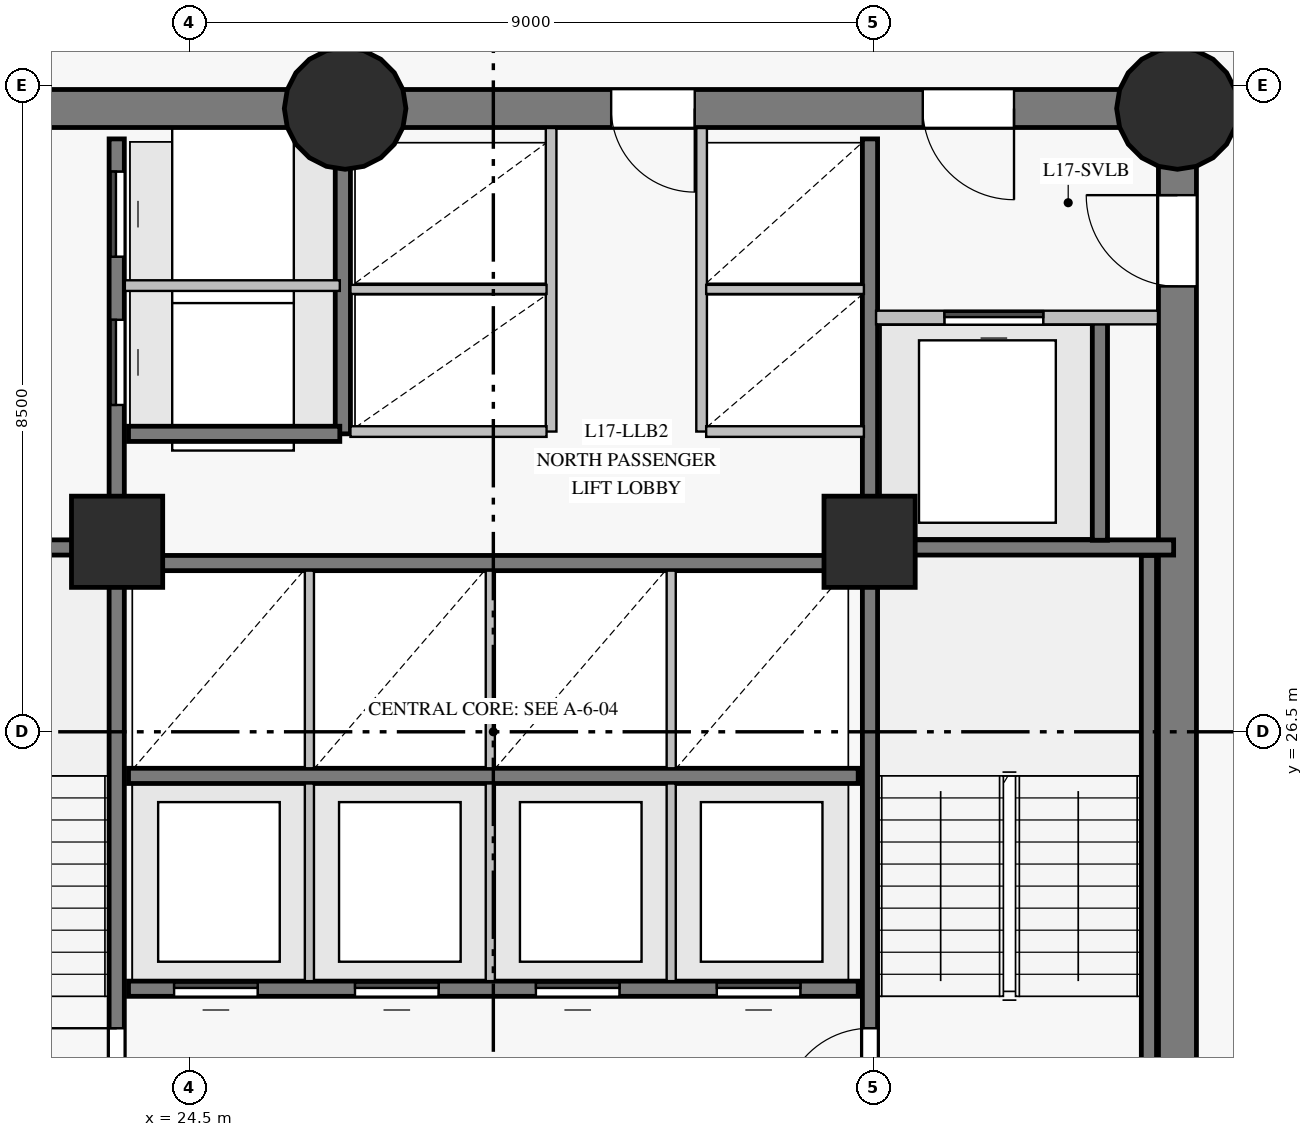
"""IFC4 building model, lengths in metres.
Left out: names, types, materials, properties, quantities, classifications, styles, units other than length and angle.
Written with IfcOpenShell. Run it as: python <this file> out.ifc"""

import sys

from ifc_helpers import new_model, si_unit, direction, frame, frame_2d, origin, origin_with_axes, origin_2d, place, context, subcontext, project, spatial, rectangle, circle, extrude, source, transform, mapped, element, fill, save


model = new_model("IFC4")
c1 = context("Model", 3, precision=1e-05, world=origin(), true_north=direction((0.0, 1.0)))
c2 = subcontext(c1, "Body", "Model", "MODEL_VIEW")
j1 = project(units=[si_unit("LENGTHUNIT", "METRE"), si_unit("PLANEANGLEUNIT", "RADIAN")], contexts=[c1])
p1 = place(None, origin())
s1 = spatial("IfcSite", under=j1, at=p1, CompositionType="ELEMENT")
p2 = place(p1, origin())
s2 = spatial("IfcBuilding", under=s1, at=p2, CompositionType="ELEMENT")
p3 = place(p2, frame((0.0, 0.0, 66.1)))
s3 = spatial("IfcBuildingStorey", under=s2, at=p3, CompositionType="ELEMENT", Elevation=66.1)
p4 = place(p3, frame((37.5, 18.3, 0.0), z_axis=(0.0, 0.0, 1.0), x_axis=(0.0, 1.0, 0.0)))
e1 = element("IfcWall", 1, at=p4, inside=s3, PredefinedType="SHEAR", context=c2, shape_type="SweptSolid", body=[
    extrude(rectangle(XDim=16.4, YDim=0.5, at=frame_2d((8.2, 0.0))), origin(), (0.0, 0.0, 1.0), 3.35),
])
p5 = place(p4, frame((14.06, 0.0, 0.0)))
e2 = element("IfcOpeningElement", 2, at=p5, cuts=e1, PredefinedType="OPENING", context=c2, shape_type="SweptSolid", body=[
    extrude(rectangle(XDim=1.2, YDim=2.15, at=frame_2d((0.6, 1.075))), frame((0.0, 0.26, 0.0), z_axis=(0.0, -1.0, 0.0), x_axis=(1.0, 0.0, 0.0)), (0.0, 0.0, 1.0), 0.52),
])
p6 = place(p3, frame((37.5, 34.7, 0.0), z_axis=(0.0, 0.0, 1.0), x_axis=(-1.0, 0.0, 0.0)))
e3 = element("IfcWall", 3, at=p6, inside=s3, PredefinedType="SHEAR", context=c2, shape_type="SweptSolid", body=[
    extrude(rectangle(XDim=10.95, YDim=0.5, at=frame_2d((5.475, 0.0))), origin(), (0.0, 0.0, 1.0), 3.35),
])
p7 = place(p6, frame((2.15, 0.0, 0.0)))
e4 = element("IfcOpeningElement", 4, at=p7, cuts=e3, PredefinedType="OPENING", context=c2, shape_type="SweptSolid", body=[
    extrude(rectangle(XDim=1.2, YDim=2.15, at=frame_2d((0.6, 1.075))), frame((0.0, 0.26, 0.0), z_axis=(0.0, -1.0, 0.0), x_axis=(1.0, 0.0, 0.0)), (0.0, 0.0, 1.0), 0.52),
])
p8 = place(p6, frame((6.35, 0.0, 0.0)))
e5 = element("IfcOpeningElement", 5, at=p8, cuts=e3, PredefinedType="OPENING", context=c2, shape_type="SweptSolid", body=[
    extrude(rectangle(XDim=1.1, YDim=2.15, at=frame_2d((0.55, 1.075))), frame((0.0, 0.26, 0.0), z_axis=(0.0, -1.0, 0.0), x_axis=(1.0, 0.0, 0.0)), (0.0, 0.0, 1.0), 0.52),
])
p9 = place(p3, frame((26.55, 34.7, 0.0), z_axis=(0.0, 0.0, 1.0), x_axis=(-1.0, 0.0, 0.0)))
e6 = element("IfcWall", 6, at=p9, inside=s3, PredefinedType="SHEAR", context=c2, shape_type="SweptSolid", body=[
    extrude(rectangle(XDim=7.05, YDim=0.5, at=frame_2d((3.525, 0.0))), origin(), (0.0, 0.0, 1.0), 3.35),
])
p10 = place(p9, frame((4.25, 0.0, 0.0)))
e7 = element("IfcOpeningElement", 7, at=p10, cuts=e6, PredefinedType="OPENING", context=c2, shape_type="SweptSolid", body=[
    extrude(rectangle(XDim=1.1, YDim=2.15, at=frame_2d((0.55, 1.075))), frame((0.0, 0.26, 0.0), z_axis=(0.0, -1.0, 0.0), x_axis=(1.0, 0.0, 0.0)), (0.0, 0.0, 1.0), 0.52),
])
m1 = source(origin_with_axes(), c2, "Body", "SweptSolid", [
    extrude(circle(Radius=0.8, at=origin_2d()), origin(), (0.0, 0.0, 1.0), 3.6),
])
for number, where, z_axis, x_axis in (
    (8, (26.55, 34.7, 0.0), (0.0, 0.0, 1.0), (1.0, 0.0, 0.0)),
    (9, (37.5, 34.7, 0.0), (0.0, 0.0, 1.0), (1.0, 0.0, 0.0)),
):
    element("IfcColumn", number, at=place(p3, frame(where, z_axis=z_axis, x_axis=x_axis)), inside=s3, PredefinedType="COLUMN", context=c2, shape_type="MappedRepresentation", body=[
        mapped(m1, transform((0.0, 0.0, 0.0), scale=1.0)),
    ])
m2 = source(origin_with_axes(), c2, "Body", "SweptSolid", [
    extrude(rectangle(XDim=1.2, YDim=1.2, at=origin_2d()), origin(), (0.0, 0.0, 1.0), 3.6),
])
for number, where, z_axis, x_axis in (
    (10, (23.55, 29.0, 0.0), (0.0, 0.0, 1.0), (1.0, 0.0, 0.0)),
    (11, (33.45, 29.0, 0.0), (0.0, 0.0, 1.0), (1.0, 0.0, 0.0)),
):
    element("IfcColumn", number, at=place(p3, frame(where, z_axis=z_axis, x_axis=x_axis)), inside=s3, PredefinedType="COLUMN", context=c2, shape_type="MappedRepresentation", body=[
        mapped(m2, transform((0.0, 0.0, 0.0), scale=1.0)),
    ])
p11 = place(p3, frame((23.545, 18.7, 0.0), z_axis=(0.0, 0.0, 1.0), x_axis=(0.0, 1.0, 0.0)))
e12 = element("IfcWall", 12, at=p11, inside=s3, PredefinedType="SHEAR", context=c2, shape_type="SweptSolid", body=[
    extrude(rectangle(XDim=15.6, YDim=0.2, at=frame_2d((7.8, 0.0))), origin(), (0.0, 0.0, 1.0), 3.35),
])
p12 = place(p11, frame((2.75, 0.0, 0.0)))
e13 = element("IfcOpeningElement", 13, at=p12, cuts=e12, PredefinedType="OPENING", context=c2, shape_type="SweptSolid", body=[
    extrude(rectangle(XDim=1.15, YDim=2.15, at=frame_2d((0.575, 1.075))), frame((0.0, 0.11, 0.0), z_axis=(0.0, -1.0, 0.0), x_axis=(1.0, 0.0, 0.0)), (0.0, 0.0, 1.0), 0.22),
])
p13 = place(p11, frame((0.14, 0.0, 0.0)))
e14 = element("IfcOpeningElement", 14, at=p13, cuts=e12, PredefinedType="OPENING", context=c2, shape_type="SweptSolid", body=[
    extrude(rectangle(XDim=0.88, YDim=2.1, at=frame_2d((0.44, 1.05))), frame((0.0, 0.11, 0.0), z_axis=(0.0, -1.0, 0.0), x_axis=(1.0, 0.0, 0.0)), (0.0, 0.0, 1.0), 0.22),
])
p14 = place(p11, frame((1.36, 0.0, 0.0)))
e15 = element("IfcOpeningElement", 15, at=p14, cuts=e12, PredefinedType="OPENING", context=c2, shape_type="SweptSolid", body=[
    extrude(rectangle(XDim=0.88, YDim=2.1, at=frame_2d((0.44, 1.05))), frame((0.0, 0.11, 0.0), z_axis=(0.0, -1.0, 0.0), x_axis=(1.0, 0.0, 0.0)), (0.0, 0.0, 1.0), 0.22),
])
p15 = place(p11, frame((12.1, 0.0, 0.0)))
e16 = element("IfcOpeningElement", 16, at=p15, cuts=e12, PredefinedType="OPENING", context=c2, shape_type="SweptSolid", body=[
    extrude(rectangle(XDim=1.12, YDim=2.15, at=frame_2d((0.56, 1.075))), frame((0.0, 0.11, 0.0), z_axis=(0.0, -1.0, 0.0), x_axis=(1.0, 0.0, 0.0)), (0.0, 0.0, 1.0), 0.22),
])
p16 = place(p11, frame((14.05, 0.0, 0.0)))
e17 = element("IfcOpeningElement", 17, at=p16, cuts=e12, PredefinedType="OPENING", context=c2, shape_type="SweptSolid", body=[
    extrude(rectangle(XDim=1.12, YDim=2.15, at=frame_2d((0.56, 1.075))), frame((0.0, 0.11, 0.0), z_axis=(0.0, -1.0, 0.0), x_axis=(1.0, 0.0, 0.0)), (0.0, 0.0, 1.0), 0.22),
])
p17 = place(p3, frame((33.455, 18.7, 0.0), z_axis=(0.0, 0.0, 1.0), x_axis=(0.0, 1.0, 0.0)))
e18 = element("IfcWall", 18, at=p17, inside=s3, PredefinedType="SHEAR", context=c2, shape_type="SweptSolid", body=[
    extrude(rectangle(XDim=15.6, YDim=0.2, at=frame_2d((7.8, 0.0))), origin(), (0.0, 0.0, 1.0), 3.35),
])
p18 = place(p17, frame((2.75, 0.0, 0.0)))
e19 = element("IfcOpeningElement", 19, at=p18, cuts=e18, PredefinedType="OPENING", context=c2, shape_type="SweptSolid", body=[
    extrude(rectangle(XDim=1.15, YDim=2.15, at=frame_2d((0.575, 1.075))), frame((0.0, 0.11, 0.0), z_axis=(0.0, -1.0, 0.0), x_axis=(1.0, 0.0, 0.0)), (0.0, 0.0, 1.0), 0.22),
])
p19 = place(p17, frame((0.55, 0.0, 0.0)))
e20 = element("IfcOpeningElement", 20, at=p19, cuts=e18, PredefinedType="OPENING", context=c2, shape_type="SweptSolid", body=[
    extrude(rectangle(XDim=0.94, YDim=2.1, at=frame_2d((0.47, 1.05))), frame((0.0, 0.11, 0.0), z_axis=(0.0, -1.0, 0.0), x_axis=(1.0, 0.0, 0.0)), (0.0, 0.0, 1.0), 0.22),
])
p20 = place(p3, frame((23.7, 23.12, 0.0), z_axis=(0.0, 0.0, 1.0), x_axis=(1.0, 0.0, 0.0)))
e21 = element("IfcWall", 21, at=p20, inside=s3, PredefinedType="SHEAR", context=c2, shape_type="SweptSolid", body=[
    extrude(rectangle(XDim=9.6, YDim=0.2, at=frame_2d((4.8, 0.0))), origin(), (0.0, 0.0, 1.0), 3.35),
])
p21 = place(p20, frame((0.6, 0.0, 0.0)))
e22 = element("IfcOpeningElement", 22, at=p21, cuts=e21, PredefinedType="OPENING", context=c2, shape_type="SweptSolid", body=[
    extrude(rectangle(XDim=1.1, YDim=2.15, at=frame_2d((0.55, 1.075))), frame((0.0, 0.11, 0.0), z_axis=(0.0, -1.0, 0.0), x_axis=(1.0, 0.0, 0.0)), (0.0, 0.0, 1.0), 0.22),
])
p22 = place(p20, frame((2.98, 0.0, 0.0)))
e23 = element("IfcOpeningElement", 23, at=p22, cuts=e21, PredefinedType="OPENING", context=c2, shape_type="SweptSolid", body=[
    extrude(rectangle(XDim=1.1, YDim=2.15, at=frame_2d((0.55, 1.075))), frame((0.0, 0.11, 0.0), z_axis=(0.0, -1.0, 0.0), x_axis=(1.0, 0.0, 0.0)), (0.0, 0.0, 1.0), 0.22),
])
p23 = place(p20, frame((5.36, 0.0, 0.0)))
e24 = element("IfcOpeningElement", 24, at=p23, cuts=e21, PredefinedType="OPENING", context=c2, shape_type="SweptSolid", body=[
    extrude(rectangle(XDim=1.1, YDim=2.15, at=frame_2d((0.55, 1.075))), frame((0.0, 0.11, 0.0), z_axis=(0.0, -1.0, 0.0), x_axis=(1.0, 0.0, 0.0)), (0.0, 0.0, 1.0), 0.22),
])
p24 = place(p20, frame((7.74, 0.0, 0.0)))
e25 = element("IfcOpeningElement", 25, at=p24, cuts=e21, PredefinedType="OPENING", context=c2, shape_type="SweptSolid", body=[
    extrude(rectangle(XDim=1.1, YDim=2.15, at=frame_2d((0.55, 1.075))), frame((0.0, 0.11, 0.0), z_axis=(0.0, -1.0, 0.0), x_axis=(1.0, 0.0, 0.0)), (0.0, 0.0, 1.0), 0.22),
])
for number, where, z_axis, x_axis in (
    (26, (23.7, 25.92, 0.0), (0.0, 0.0, 1.0), (1.0, 0.0, 0.0)),
    (27, (23.7, 28.72, 0.0), (0.0, 0.0, 1.0), (1.0, 0.0, 0.0)),
):
    element("IfcWall", number, at=place(p3, frame(where, z_axis=z_axis, x_axis=x_axis)), inside=s3, PredefinedType="SHEAR", context=c2, shape_type="SweptSolid", body=[
        extrude(rectangle(XDim=9.6, YDim=0.2, at=frame_2d((4.8, 0.0))), origin(), (0.0, 0.0, 1.0), 3.35),
    ])
p25 = place(p3, frame((37.125, 21.32, 0.0), z_axis=(0.0, 0.0, 1.0), x_axis=(0.0, 1.0, 0.0)))
e28 = element("IfcWall", 28, at=p25, inside=s3, PredefinedType="SHEAR", context=c2, shape_type="SweptSolid", body=[
    extrude(rectangle(XDim=7.5, YDim=0.2, at=frame_2d((3.75, 0.0))), origin(), (0.0, 0.0, 1.0), 3.35),
])
for number, where, z_axis, x_axis in (
    (29, (33.455, 28.925, 0.0), (0.0, 0.0, 1.0), (1.0, 0.0, 0.0)),
    (30, (19.55, 28.925, 0.0), (0.0, 0.0, 1.0), (1.0, 0.0, 0.0)),
):
    element("IfcWall", number, at=place(p3, frame(where, z_axis=z_axis, x_axis=x_axis)), inside=s3, PredefinedType="SHEAR", context=c2, shape_type="SweptSolid", body=[
        extrude(rectangle(XDim=3.995, YDim=0.2, at=frame_2d((1.998, 0.0))), origin(), (0.0, 0.0, 1.0), 3.35),
    ])
p26 = place(p3, frame((26.52, 30.42, 0.0), z_axis=(0.0, 0.0, 1.0), x_axis=(0.0, 1.0, 0.0)))
e31 = element("IfcWall", 31, at=p26, inside=s3, PredefinedType="SHEAR", context=c2, shape_type="SweptSolid", body=[
    extrude(rectangle(XDim=3.86, YDim=0.2, at=frame_2d((1.93, 0.0))), origin(), (0.0, 0.0, 1.0), 3.35),
])
p27 = place(p3, frame((36.48, 29.02, 0.0), z_axis=(0.0, 0.0, 1.0), x_axis=(0.0, 1.0, 0.0)))
e32 = element("IfcWall", 32, at=p27, inside=s3, PredefinedType="SHEAR", context=c2, shape_type="SweptSolid", body=[
    extrude(rectangle(XDim=2.86, YDim=0.2, at=frame_2d((1.43, 0.0))), origin(), (0.0, 0.0, 1.0), 3.35),
])
p28 = place(p3, frame((23.7, 30.42, 0.0), z_axis=(0.0, 0.0, 1.0), x_axis=(1.0, 0.0, 0.0)))
e33 = element("IfcWall", 33, at=p28, inside=s3, PredefinedType="SHEAR", context=c2, shape_type="SweptSolid", body=[
    extrude(rectangle(XDim=2.78, YDim=0.2, at=frame_2d((1.39, 0.0))), origin(), (0.0, 0.0, 1.0), 3.35),
])
for number, where, z_axis, x_axis in (
    (34, (29.26, 30.45, 0.0), (0.0, 0.0, 1.0), (0.0, 1.0, 0.0)),
    (35, (31.24, 30.45, 0.0), (0.0, 0.0, 1.0), (0.0, 1.0, 0.0)),
):
    element("IfcWall", number, at=place(p3, frame(where, z_axis=z_axis, x_axis=x_axis)), inside=s3, PredefinedType="PARTITIONING", context=c2, shape_type="SweptSolid", body=[
        extrude(rectangle(XDim=3.993, YDim=0.14, at=frame_2d((1.997, 0.0))), origin(), (0.0, 0.0, 1.0), 3.35),
    ])
p29 = place(p3, frame((33.535, 31.95, 0.0), z_axis=(0.0, 0.0, 1.0), x_axis=(1.0, 0.0, 0.0)))
e36 = element("IfcWall", 36, at=p29, inside=s3, PredefinedType="PARTITIONING", context=c2, shape_type="SweptSolid", body=[
    extrude(rectangle(XDim=3.709, YDim=0.18, at=frame_2d((1.854, 0.0))), origin(), (0.0, 0.0, 1.0), 3.35),
])
p30 = place(p29, frame((0.9, 0.0, 0.0)))
e37 = element("IfcOpeningElement", 37, at=p30, cuts=e36, PredefinedType="OPENING", context=c2, shape_type="SweptSolid", body=[
    extrude(rectangle(XDim=1.3, YDim=2.2, at=frame_2d((0.65, 1.1))), frame((0.0, 0.1, 0.0), z_axis=(0.0, -1.0, 0.0), x_axis=(1.0, 0.0, 0.0)), (0.0, 0.0, 1.0), 0.2),
])
p31 = place(p3, frame((23.652, 32.37, 0.0), z_axis=(0.0, 0.0, 1.0), x_axis=(1.0, 0.0, 0.0)))
e38 = element("IfcWall", 38, at=p31, inside=s3, PredefinedType="PARTITIONING", context=c2, shape_type="SweptSolid", body=[
    extrude(rectangle(XDim=2.828, YDim=0.14, at=frame_2d((1.414, 0.0))), origin(), (0.0, 0.0, 1.0), 3.35),
])
for number, where, z_axis, x_axis in (
    (39, (26.08, 23.22, 0.0), (0.0, 0.0, 1.0), (0.0, 1.0, 0.0)),
    (40, (28.46, 23.22, 0.0), (0.0, 0.0, 1.0), (0.0, 1.0, 0.0)),
    (41, (30.84, 23.22, 0.0), (0.0, 0.0, 1.0), (0.0, 1.0, 0.0)),
    (42, (26.08, 26.02, 0.0), (0.0, 0.0, 1.0), (0.0, 1.0, 0.0)),
    (43, (28.46, 26.02, 0.0), (0.0, 0.0, 1.0), (0.0, 1.0, 0.0)),
    (44, (30.84, 26.02, 0.0), (0.0, 0.0, 1.0), (0.0, 1.0, 0.0)),
):
    element("IfcWall", number, at=place(p3, frame(where, z_axis=z_axis, x_axis=x_axis)), inside=s3, PredefinedType="PARTITIONING", context=c2, shape_type="SweptSolid", body=[
        extrude(rectangle(XDim=2.6, YDim=0.12, at=frame_2d((1.3, 0.0))), origin(), (0.0, 0.0, 1.0), 3.35),
    ])
p32 = place(p3, frame((26.62, 30.45, 0.0), z_axis=(0.0, 0.0, 1.0), x_axis=(1.0, 0.0, 0.0)))
e45 = element("IfcWall", 45, at=p32, inside=s3, PredefinedType="PARTITIONING", context=c2, shape_type="SweptSolid", body=[
    extrude(rectangle(XDim=2.58, YDim=0.14, at=frame_2d((1.29, 0.0))), origin(), (0.0, 0.0, 1.0), 3.35),
])
p33 = place(p3, frame((26.62, 32.32, 0.0), z_axis=(0.0, 0.0, 1.0), x_axis=(1.0, 0.0, 0.0)))
e46 = element("IfcWall", 46, at=p33, inside=s3, PredefinedType="PARTITIONING", context=c2, shape_type="SweptSolid", body=[
    extrude(rectangle(XDim=2.58, YDim=0.12, at=frame_2d((1.29, 0.0))), origin(), (0.0, 0.0, 1.0), 3.35),
])
p34 = place(p3, frame((31.3, 30.45, 0.0), z_axis=(0.0, 0.0, 1.0), x_axis=(1.0, 0.0, 0.0)))
e47 = element("IfcWall", 47, at=p34, inside=s3, PredefinedType="PARTITIONING", context=c2, shape_type="SweptSolid", body=[
    extrude(rectangle(XDim=2.075, YDim=0.14, at=frame_2d((1.038, 0.0))), origin(), (0.0, 0.0, 1.0), 3.35),
])
p35 = place(p3, frame((31.3, 32.32, 0.0), z_axis=(0.0, 0.0, 1.0), x_axis=(1.0, 0.0, 0.0)))
e48 = element("IfcWall", 48, at=p35, inside=s3, PredefinedType="PARTITIONING", context=c2, shape_type="SweptSolid", body=[
    extrude(rectangle(XDim=2.075, YDim=0.12, at=frame_2d((1.038, 0.0))), origin(), (0.0, 0.0, 1.0), 3.35),
])
m3 = source(origin_with_axes(), c2, "Body", "SweptSolid", [
    extrude(rectangle(XDim=1.15, YDim=2.15, at=frame_2d((0.575, 1.075))), frame((0.0, 0.025, 0.0), z_axis=(0.0, -1.0, 0.0), x_axis=(1.0, 0.0, 0.0)), (0.0, 0.0, 1.0), 0.05),
])
p36 = place(p12, origin())
e49 = element("IfcDoor", 49, at=p36, inside=s3, OperationType="SINGLE_SWING_RIGHT", PredefinedType="DOOR", context=c2, shape_type="MappedRepresentation", body=[
    mapped(m3, transform((0.0, 0.0, 0.0), scale=1.0)),
])
fill(e13, e49)
p37 = place(p18, origin())
e50 = element("IfcDoor", 50, at=p37, inside=s3, OperationType="SINGLE_SWING_LEFT", PredefinedType="DOOR", context=c2, shape_type="MappedRepresentation", body=[
    mapped(m3, transform((0.0, 0.0, 0.0), scale=1.0)),
])
fill(e19, e50)
m4 = source(origin_with_axes(), c2, "Body", "SweptSolid", [
    extrude(rectangle(XDim=1.2, YDim=2.15, at=frame_2d((0.6, 1.075))), frame((0.0, 0.025, 0.0), z_axis=(0.0, -1.0, 0.0), x_axis=(1.0, 0.0, 0.0)), (0.0, 0.0, 1.0), 0.05),
])
p38 = place(p5, origin())
e51 = element("IfcDoor", 51, at=p38, inside=s3, OperationType="SINGLE_SWING_RIGHT", PredefinedType="DOOR", context=c2, shape_type="MappedRepresentation", body=[
    mapped(m4, transform((0.0, 0.0, 0.0), scale=1.0)),
])
fill(e2, e51)
p39 = place(p7, origin())
e52 = element("IfcDoor", 52, at=p39, inside=s3, OperationType="SINGLE_SWING_LEFT", PredefinedType="DOOR", context=c2, shape_type="MappedRepresentation", body=[
    mapped(m4, transform((0.0, 0.0, 0.0), scale=1.0)),
])
fill(e4, e52)
m5 = source(origin_with_axes(), c2, "Body", "SweptSolid", [
    extrude(rectangle(XDim=1.3, YDim=2.2, at=frame_2d((0.65, 1.1))), frame((0.0, 0.025, 0.0), z_axis=(0.0, -1.0, 0.0), x_axis=(1.0, 0.0, 0.0)), (0.0, 0.0, 1.0), 0.05),
])
p40 = place(p30, origin())
e53 = element("IfcDoor", 53, at=p40, inside=s3, OperationType="SLIDING_TO_LEFT", PredefinedType="DOOR", context=c2, shape_type="MappedRepresentation", body=[
    mapped(m5, transform((0.0, 0.0, 0.0), scale=1.0)),
])
fill(e37, e53)
m6 = source(origin_with_axes(), c2, "Body", "SweptSolid", [
    extrude(rectangle(XDim=1.1, YDim=2.15, at=frame_2d((0.55, 1.075))), frame((0.0, 0.025, 0.0), z_axis=(0.0, -1.0, 0.0), x_axis=(1.0, 0.0, 0.0)), (0.0, 0.0, 1.0), 0.05),
])
p41 = place(p21, origin())
e54 = element("IfcDoor", 54, at=p41, inside=s3, OperationType="SLIDING_TO_LEFT", PredefinedType="DOOR", context=c2, shape_type="MappedRepresentation", body=[
    mapped(m6, transform((0.0, 0.0, 0.0), scale=1.0)),
])
fill(e22, e54)
p42 = place(p22, origin())
e55 = element("IfcDoor", 55, at=p42, inside=s3, OperationType="SLIDING_TO_RIGHT", PredefinedType="DOOR", context=c2, shape_type="MappedRepresentation", body=[
    mapped(m6, transform((0.0, 0.0, 0.0), scale=1.0)),
])
fill(e23, e55)
p43 = place(p23, origin())
e56 = element("IfcDoor", 56, at=p43, inside=s3, OperationType="SLIDING_TO_LEFT", PredefinedType="DOOR", context=c2, shape_type="MappedRepresentation", body=[
    mapped(m6, transform((0.0, 0.0, 0.0), scale=1.0)),
])
fill(e24, e56)
p44 = place(p24, origin())
e57 = element("IfcDoor", 57, at=p44, inside=s3, OperationType="SLIDING_TO_RIGHT", PredefinedType="DOOR", context=c2, shape_type="MappedRepresentation", body=[
    mapped(m6, transform((0.0, 0.0, 0.0), scale=1.0)),
])
fill(e25, e57)
p45 = place(p8, origin())
e58 = element("IfcDoor", 58, at=p45, inside=s3, OperationType="SINGLE_SWING_LEFT", PredefinedType="DOOR", context=c2, shape_type="MappedRepresentation", body=[
    mapped(m6, transform((0.0, 0.0, 0.0), scale=1.0)),
])
fill(e5, e58)
m7 = source(origin_with_axes(), c2, "Body", "SweptSolid", [
    extrude(rectangle(XDim=1.12, YDim=2.15, at=frame_2d((0.56, 1.075))), frame((0.0, 0.025, 0.0), z_axis=(0.0, -1.0, 0.0), x_axis=(1.0, 0.0, 0.0)), (0.0, 0.0, 1.0), 0.05),
])
p46 = place(p15, origin())
e59 = element("IfcDoor", 59, at=p46, inside=s3, OperationType="SLIDING_TO_LEFT", PredefinedType="DOOR", context=c2, shape_type="MappedRepresentation", body=[
    mapped(m7, transform((0.0, 0.0, 0.0), scale=1.0)),
])
fill(e16, e59)
p47 = place(p16, origin())
e60 = element("IfcDoor", 60, at=p47, inside=s3, OperationType="SLIDING_TO_RIGHT", PredefinedType="DOOR", context=c2, shape_type="MappedRepresentation", body=[
    mapped(m7, transform((0.0, 0.0, 0.0), scale=1.0)),
])
fill(e17, e60)
save(model, sys.argv[1])
